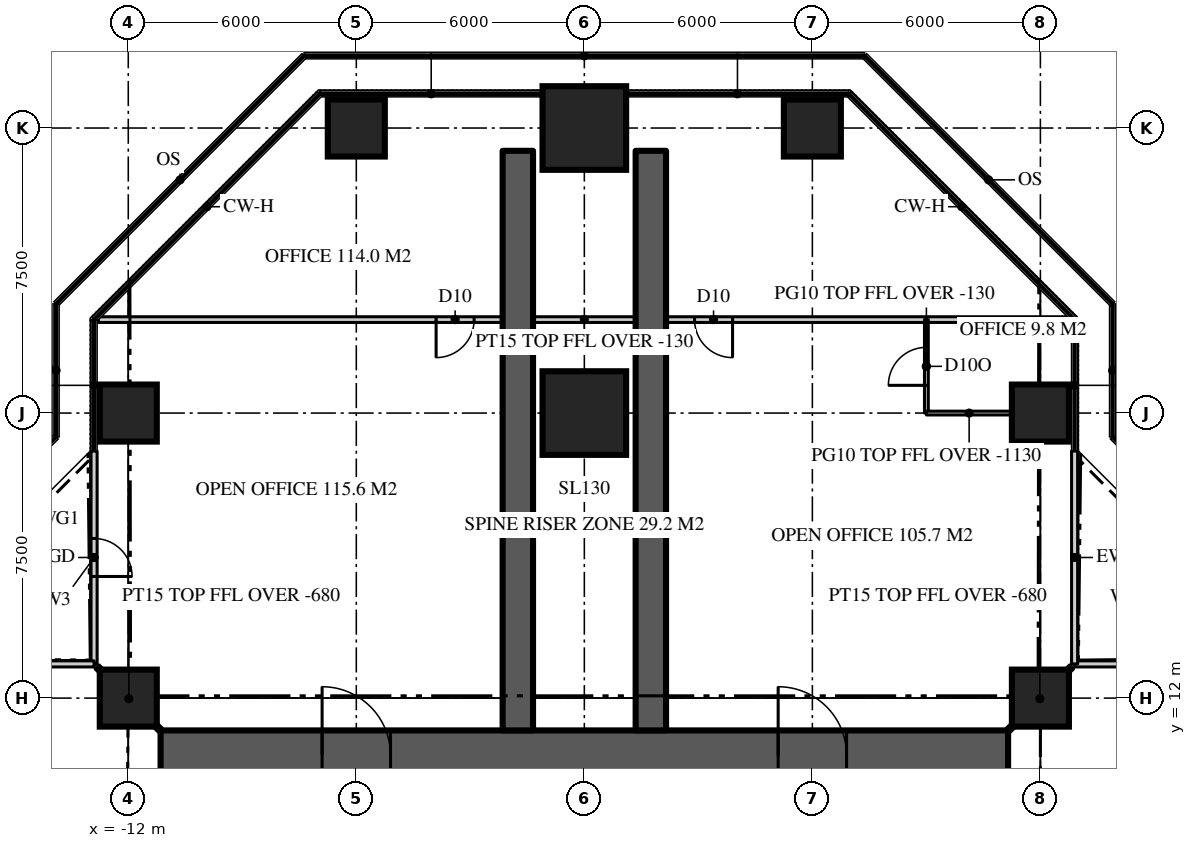
"""IFC4 building model, lengths in metres.
Left out: names, types, materials, properties, quantities, classifications, styles, units other than length and angle.
Written with IfcOpenShell. Run it as: python <this file> out.ifc"""

import sys

from ifc_helpers import new_model, si_unit, direction, frame, frame_2d, origin, origin_2d, place, context, subcontext, project, spatial, rectangle, extrude, element, fill, save


model = new_model("IFC4")
c1 = context("Model", 3, precision=1e-05, world=origin(), true_north=direction((0.0, 1.0)))
c2 = subcontext(c1, "Body", "Model", "MODEL_VIEW")
j1 = project(units=[si_unit("LENGTHUNIT", "METRE"), si_unit("PLANEANGLEUNIT", "RADIAN")], contexts=[c1])
p1 = place(None, origin())
s1 = spatial("IfcSite", under=j1, at=p1, CompositionType="ELEMENT")
p2 = place(p1, origin())
s2 = spatial("IfcBuilding", under=s1, at=p2, CompositionType="ELEMENT")
p3 = place(p2, frame((0.0, 0.0, 224.4)))
s3 = spatial("IfcBuildingStorey", under=s2, at=p3, CompositionType="ELEMENT", Elevation=224.4)
p4 = place(p3, frame((-11.15, 10.5, 0.0), z_axis=(0.0, 0.0, 1.0), x_axis=(1.0, 0.0, 0.0)))
e1 = element("IfcWall", 1, at=p4, inside=s3, PredefinedType="SHEAR", context=c2, shape_type="SweptSolid", body=[
    extrude(rectangle(XDim=22.3, YDim=1.3, at=frame_2d((11.15, 0.0))), origin(), (0.0, 0.0, 1.0), 3.9),
])
p5 = place(p4, frame((4.25, 0.0, 0.0)))
e2 = element("IfcOpeningElement", 2, at=p5, cuts=e1, PredefinedType="OPENING", context=c2, shape_type="SweptSolid", body=[
    extrude(rectangle(XDim=1.8, YDim=2.2, at=frame_2d((0.9, 1.1))), frame((0.0, 0.66, 0.0), z_axis=(0.0, -1.0, 0.0), x_axis=(1.0, 0.0, 0.0)), (0.0, 0.0, 1.0), 1.32),
])
p6 = place(p4, frame((16.25, 0.0, 0.0)))
e3 = element("IfcOpeningElement", 3, at=p6, cuts=e1, PredefinedType="OPENING", context=c2, shape_type="SweptSolid", body=[
    extrude(rectangle(XDim=1.8, YDim=2.2, at=frame_2d((0.9, 1.1))), frame((0.0, 0.66, 0.0), z_axis=(0.0, -1.0, 0.0), x_axis=(1.0, 0.0, 0.0)), (0.0, 0.0, 1.0), 1.32),
])
for number, where, z_axis, x_axis in (
    (4, (1.75, 11.15, 0.0), (0.0, 0.0, 1.0), (0.0, 1.0, 0.0)),
    (5, (-1.75, 11.15, 0.0), (0.0, 0.0, 1.0), (0.0, 1.0, 0.0)),
):
    element("IfcWall", number, at=place(p3, frame(where, z_axis=z_axis, x_axis=x_axis)), inside=s3, PredefinedType="SHEAR", context=c2, shape_type="SweptSolid", body=[
        extrude(rectangle(XDim=15.25, YDim=0.8, at=frame_2d((7.625, 0.0))), origin(), (0.0, 0.0, 1.0), 3.9),
    ])
for number, where, z_axis, x_axis in (
    (6, (-12.0, 12.0, 0.0), (0.0, 0.0, 1.0), (1.0, 0.0, 0.0)),
    (7, (12.0, 12.0, 0.0), (0.0, 0.0, 1.0), (1.0, 0.0, 0.0)),
    (8, (-12.0, 19.5, 0.0), (0.0, 0.0, 1.0), (1.0, 0.0, 0.0)),
):
    element("IfcColumn", number, at=place(p3, frame(where, z_axis=z_axis, x_axis=x_axis)), inside=s3, PredefinedType="COLUMN", context=c2, shape_type="SweptSolid", body=[
        extrude(rectangle(XDim=1.5, YDim=1.5, at=origin_2d()), origin(), (0.0, 0.0, 1.0), 3.9),
    ])
p7 = place(p3, frame((0.0, 19.5, 0.0), z_axis=(0.0, 0.0, 1.0), x_axis=(1.0, 0.0, 0.0)))
e9 = element("IfcColumn", 9, at=p7, inside=s3, PredefinedType="COLUMN", context=c2, shape_type="SweptSolid", body=[
    extrude(rectangle(XDim=2.2, YDim=2.2, at=origin_2d()), origin(), (0.0, 0.0, 1.0), 3.9),
])
for number, where, z_axis, x_axis in (
    (10, (12.0, 19.5, 0.0), (0.0, 0.0, 1.0), (1.0, 0.0, 0.0)),
    (11, (-6.0, 27.0, 0.0), (0.0, 0.0, 1.0), (1.0, 0.0, 0.0)),
):
    element("IfcColumn", number, at=place(p3, frame(where, z_axis=z_axis, x_axis=x_axis)), inside=s3, PredefinedType="COLUMN", context=c2, shape_type="SweptSolid", body=[
        extrude(rectangle(XDim=1.5, YDim=1.5, at=origin_2d()), origin(), (0.0, 0.0, 1.0), 3.9),
    ])
p8 = place(p3, frame((0.0, 27.0, 0.0), z_axis=(0.0, 0.0, 1.0), x_axis=(1.0, 0.0, 0.0)))
e12 = element("IfcColumn", 12, at=p8, inside=s3, PredefinedType="COLUMN", context=c2, shape_type="SweptSolid", body=[
    extrude(rectangle(XDim=2.2, YDim=2.2, at=origin_2d()), origin(), (0.0, 0.0, 1.0), 3.9),
])
p9 = place(p3, frame((6.0, 27.0, 0.0), z_axis=(0.0, 0.0, 1.0), x_axis=(1.0, 0.0, 0.0)))
e13 = element("IfcColumn", 13, at=p9, inside=s3, PredefinedType="COLUMN", context=c2, shape_type="SweptSolid", body=[
    extrude(rectangle(XDim=1.5, YDim=1.5, at=origin_2d()), origin(), (0.0, 0.0, 1.0), 3.9),
])
p10 = place(p3, frame((18.5, 12.9, 0.0), z_axis=(0.0, 0.0, 1.0), x_axis=(-1.0, 0.0, 0.0)))
e14 = element("IfcWall", 14, at=p10, inside=s3, PredefinedType="SOLIDWALL", context=c2, shape_type="SweptSolid", body=[
    extrude(rectangle(XDim=5.6, YDim=0.16, at=frame_2d((2.8, 0.0))), origin(), (0.0, 0.0, 1.0), 3.77),
])
p11 = place(p10, frame((2.3, 0.0, 0.0)))
e15 = element("IfcOpeningElement", 15, at=p11, cuts=e14, PredefinedType="OPENING", context=c2, shape_type="SweptSolid", body=[
    extrude(rectangle(XDim=1.0, YDim=2.2, at=frame_2d((0.5, 1.1))), frame((0.0, 0.09, 0.0), z_axis=(0.0, -1.0, 0.0), x_axis=(1.0, 0.0, 0.0)), (0.0, 0.0, 1.0), 0.18),
])
p12 = place(p3, frame((12.9, 12.9, 0.0), z_axis=(0.0, 0.0, 1.0), x_axis=(0.0, 1.0, 0.0)))
e16 = element("IfcWall", 16, at=p12, inside=s3, PredefinedType="SOLIDWALL", context=c2, shape_type="SweptSolid", body=[
    extrude(rectangle(XDim=5.6, YDim=0.16, at=frame_2d((2.8, 0.0))), origin(), (0.0, 0.0, 1.0), 3.77),
])
p13 = place(p3, frame((-12.9, 18.5, 0.0), z_axis=(0.0, 0.0, 1.0), x_axis=(0.0, -1.0, 0.0)))
e17 = element("IfcWall", 17, at=p13, inside=s3, PredefinedType="SOLIDWALL", context=c2, shape_type="SweptSolid", body=[
    extrude(rectangle(XDim=5.6, YDim=0.16, at=frame_2d((2.8, 0.0))), origin(), (0.0, 0.0, 1.0), 3.77),
])
p14 = place(p13, frame((2.3, 0.0, 0.0)))
e18 = element("IfcOpeningElement", 18, at=p14, cuts=e17, PredefinedType="OPENING", context=c2, shape_type="SweptSolid", body=[
    extrude(rectangle(XDim=1.0, YDim=2.2, at=frame_2d((0.5, 1.1))), frame((0.0, 0.09, 0.0), z_axis=(0.0, -1.0, 0.0), x_axis=(1.0, 0.0, 0.0)), (0.0, 0.0, 1.0), 0.18),
])
p15 = place(p3, frame((-12.9, 12.9, 0.0), z_axis=(0.0, 0.0, 1.0), x_axis=(-1.0, 0.0, 0.0)))
e19 = element("IfcWall", 19, at=p15, inside=s3, PredefinedType="SOLIDWALL", context=c2, shape_type="SweptSolid", body=[
    extrude(rectangle(XDim=5.6, YDim=0.16, at=frame_2d((2.8, 0.0))), origin(), (0.0, 0.0, 1.0), 3.77),
])
p16 = place(p3, frame((12.786, 21.959, 0.0), z_axis=(0.0, 0.0, 1.0), x_axis=(-1.0, 0.0, 0.0)))
e20 = element("IfcWall", 20, at=p16, inside=s3, PredefinedType="PARTITIONING", context=c2, shape_type="SweptSolid", body=[
    extrude(rectangle(XDim=25.573, YDim=0.15, at=frame_2d((12.786, 0.0))), origin(), (0.0, 0.0, 1.0), 3.77),
])
p17 = place(p16, frame((15.687, 0.0, 0.0)))
e21 = element("IfcOpeningElement", 21, at=p17, cuts=e20, PredefinedType="OPENING", context=c2, shape_type="SweptSolid", body=[
    extrude(rectangle(XDim=1.0, YDim=2.2, at=frame_2d((0.5, 1.1))), frame((0.0, 0.085, 0.0), z_axis=(0.0, -1.0, 0.0), x_axis=(1.0, 0.0, 0.0)), (0.0, 0.0, 1.0), 0.17),
])
p18 = place(p16, frame((8.886, 0.0, 0.0)))
e22 = element("IfcOpeningElement", 22, at=p18, cuts=e20, PredefinedType="OPENING", context=c2, shape_type="SweptSolid", body=[
    extrude(rectangle(XDim=1.0, YDim=2.2, at=frame_2d((0.5, 1.1))), frame((0.0, 0.085, 0.0), z_axis=(0.0, -1.0, 0.0), x_axis=(1.0, 0.0, 0.0)), (0.0, 0.0, 1.0), 0.17),
])
p19 = place(p3, frame((9.0, 19.5, 0.0), z_axis=(0.0, 0.0, 1.0), x_axis=(0.0, 1.0, 0.0)))
e23 = element("IfcWall", 23, at=p19, inside=s3, PredefinedType="PARTITIONING", context=c2, shape_type="SweptSolid", body=[
    extrude(rectangle(XDim=2.459, YDim=0.1, at=frame_2d((1.229, 0.0))), origin(), (0.0, 0.0, 1.0), 3.77),
])
p20 = place(p19, frame((0.729, 0.0, 0.0)))
e24 = element("IfcOpeningElement", 24, at=p20, cuts=e23, PredefinedType="OPENING", context=c2, shape_type="SweptSolid", body=[
    extrude(rectangle(XDim=1.0, YDim=2.2, at=frame_2d((0.5, 1.1))), frame((0.0, 0.06, 0.0), z_axis=(0.0, -1.0, 0.0), x_axis=(1.0, 0.0, 0.0)), (0.0, 0.0, 1.0), 0.12),
])
p21 = place(p3, frame((9.0, 19.5, 0.0), z_axis=(0.0, 0.0, 1.0), x_axis=(1.0, 0.0, 0.0)))
e25 = element("IfcWall", 25, at=p21, inside=s3, PredefinedType="PARTITIONING", context=c2, shape_type="SweptSolid", body=[
    extrude(rectangle(XDim=2.25, YDim=0.1, at=frame_2d((1.125, 0.0))), origin(), (0.0, 0.0, 1.0), 2.77),
])
for number, where, z_axis, x_axis in (
    (26, (11.15, 11.15, 0.0), (0.0, 0.0, 1.0), (0.707, 0.707, 0.0)),
    (27, (-11.15, 11.15, 0.0), (0.0, 0.0, 1.0), (-0.707, 0.707, 0.0)),
):
    element("IfcWall", number, at=place(p3, frame(where, z_axis=z_axis, x_axis=x_axis)), inside=s3, PredefinedType="PARTITIONING", context=c2, shape_type="SweptSolid", body=[
        extrude(rectangle(XDim=2.362, YDim=0.15, at=frame_2d((1.181, 0.0))), origin(), (0.0, 0.0, 1.0), 3.22),
    ])
p22 = place(p14, origin())
e28 = element("IfcDoor", 28, at=p22, inside=s3, OperationType="SINGLE_SWING_RIGHT", PredefinedType="DOOR", context=c2, shape_type="SweptSolid", body=[
    extrude(rectangle(XDim=1.0, YDim=2.2, at=frame_2d((0.5, 1.1))), frame((0.0, 0.025, 0.0), z_axis=(0.0, -1.0, 0.0), x_axis=(1.0, 0.0, 0.0)), (0.0, 0.0, 1.0), 0.05),
])
fill(e18, e28)
p23 = place(p5, origin())
e29 = element("IfcDoor", 29, at=p23, inside=s3, OperationType="DOUBLE_DOOR_DOUBLE_SWING", PredefinedType="DOOR", context=c2, shape_type="SweptSolid", body=[
    extrude(rectangle(XDim=1.8, YDim=2.2, at=frame_2d((0.9, 1.1))), frame((0.0, 0.025, 0.0), z_axis=(0.0, -1.0, 0.0), x_axis=(1.0, 0.0, 0.0)), (0.0, 0.0, 1.0), 0.05),
])
fill(e2, e29)
p24 = place(p6, origin())
e30 = element("IfcDoor", 30, at=p24, inside=s3, OperationType="DOUBLE_DOOR_DOUBLE_SWING", PredefinedType="DOOR", context=c2, shape_type="SweptSolid", body=[
    extrude(rectangle(XDim=1.8, YDim=2.2, at=frame_2d((0.9, 1.1))), frame((0.0, 0.025, 0.0), z_axis=(0.0, -1.0, 0.0), x_axis=(1.0, 0.0, 0.0)), (0.0, 0.0, 1.0), 0.05),
])
fill(e3, e30)
p25 = place(p17, origin())
e31 = element("IfcDoor", 31, at=p25, inside=s3, OperationType="SINGLE_SWING_RIGHT", PredefinedType="DOOR", context=c2, shape_type="SweptSolid", body=[
    extrude(rectangle(XDim=1.0, YDim=2.2, at=frame_2d((0.5, 1.1))), frame((0.0, 0.025, 0.0), z_axis=(0.0, -1.0, 0.0), x_axis=(1.0, 0.0, 0.0)), (0.0, 0.0, 1.0), 0.05),
])
fill(e21, e31)
p26 = place(p18, origin())
e32 = element("IfcDoor", 32, at=p26, inside=s3, OperationType="SINGLE_SWING_LEFT", PredefinedType="DOOR", context=c2, shape_type="SweptSolid", body=[
    extrude(rectangle(XDim=1.0, YDim=2.2, at=frame_2d((0.5, 1.1))), frame((0.0, 0.025, 0.0), z_axis=(0.0, -1.0, 0.0), x_axis=(1.0, 0.0, 0.0)), (0.0, 0.0, 1.0), 0.05),
])
fill(e22, e32)
p27 = place(p20, origin())
e33 = element("IfcDoor", 33, at=p27, inside=s3, OperationType="SINGLE_SWING_LEFT", PredefinedType="DOOR", context=c2, shape_type="SweptSolid", body=[
    extrude(rectangle(XDim=1.0, YDim=2.2, at=frame_2d((0.5, 1.1))), frame((0.0, 0.025, 0.0), z_axis=(0.0, -1.0, 0.0), x_axis=(1.0, 0.0, 0.0)), (0.0, 0.0, 1.0), 0.05),
])
fill(e24, e33)
save(model, sys.argv[1])
